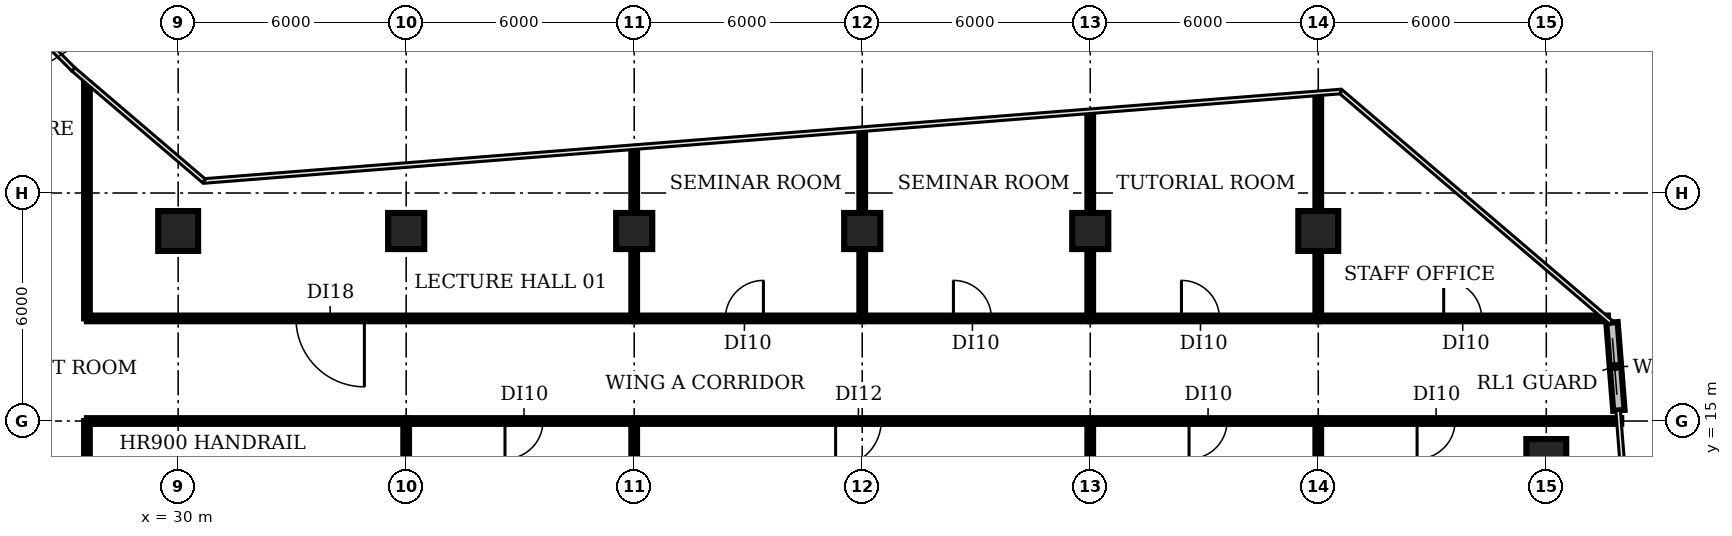
"""IFC4 building model, lengths in metres.
Left out: names, types, materials, properties, quantities, classifications, styles, units other than length and angle.
Written with IfcOpenShell. Run it as: python <this file> out.ifc"""

import sys

from ifc_helpers import new_model, si_unit, direction, frame, frame_2d, origin, origin_2d, place, context, subcontext, project, spatial, rectangle, circle, extrude, element, fill, save


model = new_model("IFC4")
c1 = context("Model", 3, precision=1e-05, world=origin(), true_north=direction((0.0, 1.0)))
c2 = subcontext(c1, "Body", "Model", "MODEL_VIEW")
j1 = project(units=[si_unit("LENGTHUNIT", "METRE"), si_unit("PLANEANGLEUNIT", "RADIAN")], contexts=[c1])
p1 = place(None, origin())
s1 = spatial("IfcSite", under=j1, at=p1, CompositionType="ELEMENT")
p2 = place(p1, origin())
s2 = spatial("IfcBuilding", under=s1, at=p2, CompositionType="ELEMENT")
p3 = place(p2, frame((0.0, 0.0, 71.0)))
s3 = spatial("IfcBuildingStorey", under=s2, at=p3, CompositionType="ELEMENT", Elevation=71.0)
p4 = place(p3, frame((30.0, 20.0, 0.0), z_axis=(0.0, 0.0, 1.0), x_axis=(1.0, 0.0, 0.0)))
e1 = element("IfcColumn", 1, at=p4, inside=s3, PredefinedType="COLUMN", context=c2, shape_type="SweptSolid", body=[
    extrude(circle(Radius=0.525, at=origin_2d()), origin(), (0.0, 0.0, 1.0), 3.85),
])
for number, where, z_axis, x_axis in (
    (2, (36.0, 20.0, 0.0), (0.0, 0.0, 1.0), (1.0, 0.0, 0.0)),
    (3, (42.0, 20.0, 0.0), (0.0, 0.0, 1.0), (1.0, 0.0, 0.0)),
    (4, (48.0, 20.0, 0.0), (0.0, 0.0, 1.0), (1.0, 0.0, 0.0)),
    (5, (54.0, 20.0, 0.0), (0.0, 0.0, 1.0), (1.0, 0.0, 0.0)),
):
    element("IfcColumn", number, at=place(p3, frame(where, z_axis=z_axis, x_axis=x_axis)), inside=s3, PredefinedType="COLUMN", context=c2, shape_type="SweptSolid", body=[
        extrude(rectangle(XDim=0.95, YDim=0.95, at=origin_2d()), origin(), (0.0, 0.0, 1.0), 3.85),
    ])
for number, where, z_axis, x_axis in (
    (6, (60.0, 20.0, 0.0), (0.0, 0.0, 1.0), (1.0, 0.0, 0.0)),
    (7, (66.0, 14.0, 0.0), (0.0, 0.0, 1.0), (1.0, 0.0, 0.0)),
):
    element("IfcColumn", number, at=place(p3, frame(where, z_axis=z_axis, x_axis=x_axis)), inside=s3, PredefinedType="COLUMN", context=c2, shape_type="SweptSolid", body=[
        extrude(circle(Radius=0.525, at=origin_2d()), origin(), (0.0, 0.0, 1.0), 3.85),
    ])
p5 = place(p3, frame((67.911, 15.28, 0.0), z_axis=(0.0, 0.0, 1.0), x_axis=(-0.078427168451, 0.99691984595, 0.0)))
e8 = element("IfcWall", 8, at=p5, inside=s3, PredefinedType="SOLIDWALL", context=c2, shape_type="SweptSolid", body=[
    extrude(rectangle(XDim=2.319, YDim=0.3, at=frame_2d((1.16, 0.0))), origin(), (0.0, 0.0, 1.0), 3.85),
])
p6 = place(p3, frame((27.6, 15.0, 0.0), z_axis=(0.0, 0.0, 1.0), x_axis=(0.0, -1.0, 0.0)))
e9 = element("IfcWall", 9, at=p6, inside=s3, PredefinedType="PARTITIONING", context=c2, shape_type="SweptSolid", body=[
    extrude(rectangle(XDim=10.5, YDim=0.15, at=frame_2d((5.25, 0.0))), origin(), (0.0, 0.0, 1.0), 2.83),
])
p7 = place(p6, frame((4.8, 0.0, 0.0)))
e10 = element("IfcOpeningElement", 10, at=p7, cuts=e9, PredefinedType="OPENING", context=c2, shape_type="SweptSolid", body=[
    extrude(rectangle(XDim=1.0, YDim=2.1, at=frame_2d((0.5, 1.05))), frame((0.0, 0.085, 0.0), z_axis=(0.0, -1.0, 0.0), x_axis=(1.0, 0.0, 0.0)), (0.0, 0.0, 1.0), 0.17),
])
p8 = place(p3, frame((27.6, 15.0, 0.0), z_axis=(0.0, 0.0, 1.0), x_axis=(1.0, 0.0, 0.0)))
e11 = element("IfcWall", 11, at=p8, inside=s3, PredefinedType="PARTITIONING", context=c2, shape_type="SweptSolid", body=[
    extrude(rectangle(XDim=8.4, YDim=0.15, at=frame_2d((4.2, 0.0))), origin(), (0.0, 0.0, 1.0), 2.83),
])
p9 = place(p3, frame((27.6, 17.7, 0.0), z_axis=(0.0, 0.0, 1.0), x_axis=(0.0, 1.0, 0.0)))
e12 = element("IfcWall", 12, at=p9, inside=s3, PredefinedType="PARTITIONING", context=c2, shape_type="SweptSolid", body=[
    extrude(rectangle(XDim=6.18, YDim=0.15, at=frame_2d((3.09, 0.0))), origin(), (0.0, 0.0, 1.0), 2.83),
])
for number, where, z_axis, x_axis in (
    (13, (36.0, -5.01, 0.0), (0.0, 0.0, 1.0), (0.0, 1.0, 0.0)),
    (14, (42.0, -5.01, 0.0), (0.0, 0.0, 1.0), (0.0, 1.0, 0.0)),
):
    element("IfcWall", number, at=place(p3, frame(where, z_axis=z_axis, x_axis=x_axis)), inside=s3, PredefinedType="PARTITIONING", context=c2, shape_type="SweptSolid", body=[
        extrude(rectangle(XDim=20.01, YDim=0.15, at=frame_2d((10.005, 0.0))), origin(), (0.0, 0.0, 1.0), 2.83),
    ])
p10 = place(p3, frame((42.0, 15.0, 0.0), z_axis=(0.0, 0.0, 1.0), x_axis=(-1.0, 0.0, 0.0)))
e15 = element("IfcWall", 15, at=p10, inside=s3, PredefinedType="PARTITIONING", context=c2, shape_type="SweptSolid", body=[
    extrude(rectangle(XDim=6.0, YDim=0.15, at=frame_2d((3.0, 0.0))), origin(), (0.0, 0.0, 1.0), 2.83),
])
p11 = place(p10, frame((2.4, 0.0, 0.0)))
e16 = element("IfcOpeningElement", 16, at=p11, cuts=e15, PredefinedType="OPENING", context=c2, shape_type="SweptSolid", body=[
    extrude(rectangle(XDim=1.0, YDim=2.1, at=frame_2d((0.5, 1.05))), frame((0.0, 0.085, 0.0), z_axis=(0.0, -1.0, 0.0), x_axis=(1.0, 0.0, 0.0)), (0.0, 0.0, 1.0), 0.17),
])
p12 = place(p3, frame((42.0, 17.7, 0.0), z_axis=(0.0, 0.0, 1.0), x_axis=(-1.0, 0.0, 0.0)))
e17 = element("IfcWall", 17, at=p12, inside=s3, PredefinedType="PARTITIONING", context=c2, shape_type="SweptSolid", body=[
    extrude(rectangle(XDim=14.4, YDim=0.15, at=frame_2d((7.2, 0.0))), origin(), (0.0, 0.0, 1.0), 2.83),
])
p13 = place(p12, frame((7.1, 0.0, 0.0)))
e18 = element("IfcOpeningElement", 18, at=p13, cuts=e17, PredefinedType="OPENING", context=c2, shape_type="SweptSolid", body=[
    extrude(rectangle(XDim=1.8, YDim=2.1, at=frame_2d((0.9, 1.05))), frame((0.0, 0.085, 0.0), z_axis=(0.0, -1.0, 0.0), x_axis=(1.0, 0.0, 0.0)), (0.0, 0.0, 1.0), 0.17),
])
p14 = place(p3, frame((42.0, 17.7, 0.0), z_axis=(0.0, 0.0, 1.0), x_axis=(0.0, 1.0, 0.0)))
e19 = element("IfcWall", 19, at=p14, inside=s3, PredefinedType="PARTITIONING", context=c2, shape_type="SweptSolid", body=[
    extrude(rectangle(XDim=4.46, YDim=0.15, at=frame_2d((2.23, 0.0))), origin(), (0.0, 0.0, 1.0), 2.83),
])
p15 = place(p3, frame((42.0, 17.7, 0.0), z_axis=(0.0, 0.0, 1.0), x_axis=(1.0, 0.0, 0.0)))
e20 = element("IfcWall", 20, at=p15, inside=s3, PredefinedType="PARTITIONING", context=c2, shape_type="SweptSolid", body=[
    extrude(rectangle(XDim=6.0, YDim=0.15, at=frame_2d((3.0, 0.0))), origin(), (0.0, 0.0, 1.0), 2.83),
])
p16 = place(p15, frame((2.4, 0.0, 0.0)))
e21 = element("IfcOpeningElement", 21, at=p16, cuts=e20, PredefinedType="OPENING", context=c2, shape_type="SweptSolid", body=[
    extrude(rectangle(XDim=1.0, YDim=2.1, at=frame_2d((0.5, 1.05))), frame((0.0, 0.085, 0.0), z_axis=(0.0, -1.0, 0.0), x_axis=(1.0, 0.0, 0.0)), (0.0, 0.0, 1.0), 0.17),
])
p17 = place(p3, frame((48.0, 17.7, 0.0), z_axis=(0.0, 0.0, 1.0), x_axis=(0.0, 1.0, 0.0)))
e22 = element("IfcWall", 22, at=p17, inside=s3, PredefinedType="PARTITIONING", context=c2, shape_type="SweptSolid", body=[
    extrude(rectangle(XDim=4.93, YDim=0.15, at=frame_2d((2.465, 0.0))), origin(), (0.0, 0.0, 1.0), 2.83),
])
p18 = place(p3, frame((48.0, 17.7, 0.0), z_axis=(0.0, 0.0, 1.0), x_axis=(1.0, 0.0, 0.0)))
e23 = element("IfcWall", 23, at=p18, inside=s3, PredefinedType="PARTITIONING", context=c2, shape_type="SweptSolid", body=[
    extrude(rectangle(XDim=6.0, YDim=0.15, at=frame_2d((3.0, 0.0))), origin(), (0.0, 0.0, 1.0), 2.83),
])
p19 = place(p18, frame((2.4, 0.0, 0.0)))
e24 = element("IfcOpeningElement", 24, at=p19, cuts=e23, PredefinedType="OPENING", context=c2, shape_type="SweptSolid", body=[
    extrude(rectangle(XDim=1.0, YDim=2.1, at=frame_2d((0.5, 1.05))), frame((0.0, 0.085, 0.0), z_axis=(0.0, -1.0, 0.0), x_axis=(1.0, 0.0, 0.0)), (0.0, 0.0, 1.0), 0.17),
])
p20 = place(p3, frame((54.0, -4.993, 0.0), z_axis=(0.0, 0.0, 1.0), x_axis=(0.0, 1.0, 0.0)))
e25 = element("IfcWall", 25, at=p20, inside=s3, PredefinedType="PARTITIONING", context=c2, shape_type="SweptSolid", body=[
    extrude(rectangle(XDim=19.993, YDim=0.15, at=frame_2d((9.997, 0.0))), origin(), (0.0, 0.0, 1.0), 2.83),
])
p21 = place(p3, frame((54.0, 15.0, 0.0), z_axis=(0.0, 0.0, 1.0), x_axis=(-1.0, 0.0, 0.0)))
e26 = element("IfcWall", 26, at=p21, inside=s3, PredefinedType="PARTITIONING", context=c2, shape_type="SweptSolid", body=[
    extrude(rectangle(XDim=12.0, YDim=0.15, at=frame_2d((6.0, 0.0))), origin(), (0.0, 0.0, 1.0), 2.83),
])
p22 = place(p21, frame((5.5, 0.0, 0.0)))
e27 = element("IfcOpeningElement", 27, at=p22, cuts=e26, PredefinedType="OPENING", context=c2, shape_type="SweptSolid", body=[
    extrude(rectangle(XDim=1.2, YDim=2.1, at=frame_2d((0.6, 1.05))), frame((0.0, 0.085, 0.0), z_axis=(0.0, -1.0, 0.0), x_axis=(1.0, 0.0, 0.0)), (0.0, 0.0, 1.0), 0.17),
])
p23 = place(p3, frame((54.0, 17.7, 0.0), z_axis=(0.0, 0.0, 1.0), x_axis=(0.0, 1.0, 0.0)))
e28 = element("IfcWall", 28, at=p23, inside=s3, PredefinedType="PARTITIONING", context=c2, shape_type="SweptSolid", body=[
    extrude(rectangle(XDim=5.4, YDim=0.15, at=frame_2d((2.7, 0.0))), origin(), (0.0, 0.0, 1.0), 2.83),
])
p24 = place(p3, frame((54.0, 17.7, 0.0), z_axis=(0.0, 0.0, 1.0), x_axis=(1.0, 0.0, 0.0)))
e29 = element("IfcWall", 29, at=p24, inside=s3, PredefinedType="PARTITIONING", context=c2, shape_type="SweptSolid", body=[
    extrude(rectangle(XDim=6.0, YDim=0.15, at=frame_2d((3.0, 0.0))), origin(), (0.0, 0.0, 1.0), 2.83),
])
p25 = place(p24, frame((2.4, 0.0, 0.0)))
e30 = element("IfcOpeningElement", 30, at=p25, cuts=e29, PredefinedType="OPENING", context=c2, shape_type="SweptSolid", body=[
    extrude(rectangle(XDim=1.0, YDim=2.1, at=frame_2d((0.5, 1.05))), frame((0.0, 0.085, 0.0), z_axis=(0.0, -1.0, 0.0), x_axis=(1.0, 0.0, 0.0)), (0.0, 0.0, 1.0), 0.17),
])
p26 = place(p3, frame((60.0, -5.01, 0.0), z_axis=(0.0, 0.0, 1.0), x_axis=(0.0, 1.0, 0.0)))
e31 = element("IfcWall", 31, at=p26, inside=s3, PredefinedType="PARTITIONING", context=c2, shape_type="SweptSolid", body=[
    extrude(rectangle(XDim=20.01, YDim=0.15, at=frame_2d((10.005, 0.0))), origin(), (0.0, 0.0, 1.0), 2.83),
])
p27 = place(p3, frame((60.0, 15.0, 0.0), z_axis=(0.0, 0.0, 1.0), x_axis=(-1.0, 0.0, 0.0)))
e32 = element("IfcWall", 32, at=p27, inside=s3, PredefinedType="PARTITIONING", context=c2, shape_type="SweptSolid", body=[
    extrude(rectangle(XDim=6.0, YDim=0.15, at=frame_2d((3.0, 0.0))), origin(), (0.0, 0.0, 1.0), 2.83),
])
p28 = place(p27, frame((2.4, 0.0, 0.0)))
e33 = element("IfcOpeningElement", 33, at=p28, cuts=e32, PredefinedType="OPENING", context=c2, shape_type="SweptSolid", body=[
    extrude(rectangle(XDim=1.0, YDim=2.1, at=frame_2d((0.5, 1.05))), frame((0.0, 0.085, 0.0), z_axis=(0.0, -1.0, 0.0), x_axis=(1.0, 0.0, 0.0)), (0.0, 0.0, 1.0), 0.17),
])
p29 = place(p3, frame((60.0, 17.7, 0.0), z_axis=(0.0, 0.0, 1.0), x_axis=(0.0, 1.0, 0.0)))
e34 = element("IfcWall", 34, at=p29, inside=s3, PredefinedType="PARTITIONING", context=c2, shape_type="SweptSolid", body=[
    extrude(rectangle(XDim=5.87, YDim=0.15, at=frame_2d((2.935, 0.0))), origin(), (0.0, 0.0, 1.0), 2.83),
])
p30 = place(p3, frame((60.0, 17.7, 0.0), z_axis=(0.0, 0.0, 1.0), x_axis=(1.0, 0.0, 0.0)))
e35 = element("IfcWall", 35, at=p30, inside=s3, PredefinedType="PARTITIONING", context=c2, shape_type="SweptSolid", body=[
    extrude(rectangle(XDim=7.62, YDim=0.15, at=frame_2d((3.81, 0.0))), origin(), (0.0, 0.0, 1.0), 2.83),
])
p31 = place(p30, frame((3.3, 0.0, 0.0)))
e36 = element("IfcOpeningElement", 36, at=p31, cuts=e35, PredefinedType="OPENING", context=c2, shape_type="SweptSolid", body=[
    extrude(rectangle(XDim=1.0, YDim=2.1, at=frame_2d((0.5, 1.05))), frame((0.0, 0.085, 0.0), z_axis=(0.0, -1.0, 0.0), x_axis=(1.0, 0.0, 0.0)), (0.0, 0.0, 1.0), 0.17),
])
p32 = place(p3, frame((67.972, 15.0, 0.0), z_axis=(0.0, 0.0, 1.0), x_axis=(-1.0, 0.0, 0.0)))
e37 = element("IfcWall", 37, at=p32, inside=s3, PredefinedType="PARTITIONING", context=c2, shape_type="SweptSolid", body=[
    extrude(rectangle(XDim=7.972, YDim=0.15, at=frame_2d((3.986, 0.0))), origin(), (0.0, 0.0, 1.0), 2.83),
])
p33 = place(p32, frame((4.372, 0.0, 0.0)))
e38 = element("IfcOpeningElement", 38, at=p33, cuts=e37, PredefinedType="OPENING", context=c2, shape_type="SweptSolid", body=[
    extrude(rectangle(XDim=1.0, YDim=2.1, at=frame_2d((0.5, 1.05))), frame((0.0, 0.085, 0.0), z_axis=(0.0, -1.0, 0.0), x_axis=(1.0, 0.0, 0.0)), (0.0, 0.0, 1.0), 0.17),
])
p34 = place(p11, origin())
e39 = element("IfcDoor", 39, at=p34, inside=s3, OperationType="SINGLE_SWING_RIGHT", PredefinedType="DOOR", context=c2, shape_type="SweptSolid", body=[
    extrude(rectangle(XDim=1.0, YDim=2.1, at=frame_2d((0.5, 1.05))), frame((0.0, 0.025, 0.0), z_axis=(0.0, -1.0, 0.0), x_axis=(1.0, 0.0, 0.0)), (0.0, 0.0, 1.0), 0.05),
])
fill(e16, e39)
p35 = place(p13, origin())
e40 = element("IfcDoor", 40, at=p35, inside=s3, OperationType="SINGLE_SWING_LEFT", PredefinedType="DOOR", context=c2, shape_type="SweptSolid", body=[
    extrude(rectangle(XDim=1.8, YDim=2.1, at=frame_2d((0.9, 1.05))), frame((0.0, 0.025, 0.0), z_axis=(0.0, -1.0, 0.0), x_axis=(1.0, 0.0, 0.0)), (0.0, 0.0, 1.0), 0.05),
])
fill(e18, e40)
p36 = place(p16, origin())
e41 = element("IfcDoor", 41, at=p36, inside=s3, OperationType="SINGLE_SWING_RIGHT", PredefinedType="DOOR", context=c2, shape_type="SweptSolid", body=[
    extrude(rectangle(XDim=1.0, YDim=2.1, at=frame_2d((0.5, 1.05))), frame((0.0, 0.025, 0.0), z_axis=(0.0, -1.0, 0.0), x_axis=(1.0, 0.0, 0.0)), (0.0, 0.0, 1.0), 0.05),
])
fill(e21, e41)
p37 = place(p19, origin())
e42 = element("IfcDoor", 42, at=p37, inside=s3, OperationType="SINGLE_SWING_LEFT", PredefinedType="DOOR", context=c2, shape_type="SweptSolid", body=[
    extrude(rectangle(XDim=1.0, YDim=2.1, at=frame_2d((0.5, 1.05))), frame((0.0, 0.025, 0.0), z_axis=(0.0, -1.0, 0.0), x_axis=(1.0, 0.0, 0.0)), (0.0, 0.0, 1.0), 0.05),
])
fill(e24, e42)
p38 = place(p22, origin())
e43 = element("IfcDoor", 43, at=p38, inside=s3, OperationType="SINGLE_SWING_RIGHT", PredefinedType="DOOR", context=c2, shape_type="SweptSolid", body=[
    extrude(rectangle(XDim=1.2, YDim=2.1, at=frame_2d((0.6, 1.05))), frame((0.0, 0.025, 0.0), z_axis=(0.0, -1.0, 0.0), x_axis=(1.0, 0.0, 0.0)), (0.0, 0.0, 1.0), 0.05),
])
fill(e27, e43)
p39 = place(p25, origin())
e44 = element("IfcDoor", 44, at=p39, inside=s3, OperationType="SINGLE_SWING_LEFT", PredefinedType="DOOR", context=c2, shape_type="SweptSolid", body=[
    extrude(rectangle(XDim=1.0, YDim=2.1, at=frame_2d((0.5, 1.05))), frame((0.0, 0.025, 0.0), z_axis=(0.0, -1.0, 0.0), x_axis=(1.0, 0.0, 0.0)), (0.0, 0.0, 1.0), 0.05),
])
fill(e30, e44)
p40 = place(p28, origin())
e45 = element("IfcDoor", 45, at=p40, inside=s3, OperationType="SINGLE_SWING_RIGHT", PredefinedType="DOOR", context=c2, shape_type="SweptSolid", body=[
    extrude(rectangle(XDim=1.0, YDim=2.1, at=frame_2d((0.5, 1.05))), frame((0.0, 0.025, 0.0), z_axis=(0.0, -1.0, 0.0), x_axis=(1.0, 0.0, 0.0)), (0.0, 0.0, 1.0), 0.05),
])
fill(e33, e45)
p41 = place(p31, origin())
e46 = element("IfcDoor", 46, at=p41, inside=s3, OperationType="SINGLE_SWING_LEFT", PredefinedType="DOOR", context=c2, shape_type="SweptSolid", body=[
    extrude(rectangle(XDim=1.0, YDim=2.1, at=frame_2d((0.5, 1.05))), frame((0.0, 0.025, 0.0), z_axis=(0.0, -1.0, 0.0), x_axis=(1.0, 0.0, 0.0)), (0.0, 0.0, 1.0), 0.05),
])
fill(e36, e46)
p42 = place(p33, origin())
e47 = element("IfcDoor", 47, at=p42, inside=s3, OperationType="SINGLE_SWING_RIGHT", PredefinedType="DOOR", context=c2, shape_type="SweptSolid", body=[
    extrude(rectangle(XDim=1.0, YDim=2.1, at=frame_2d((0.5, 1.05))), frame((0.0, 0.025, 0.0), z_axis=(0.0, -1.0, 0.0), x_axis=(1.0, 0.0, 0.0)), (0.0, 0.0, 1.0), 0.05),
])
fill(e38, e47)
save(model, sys.argv[1])
